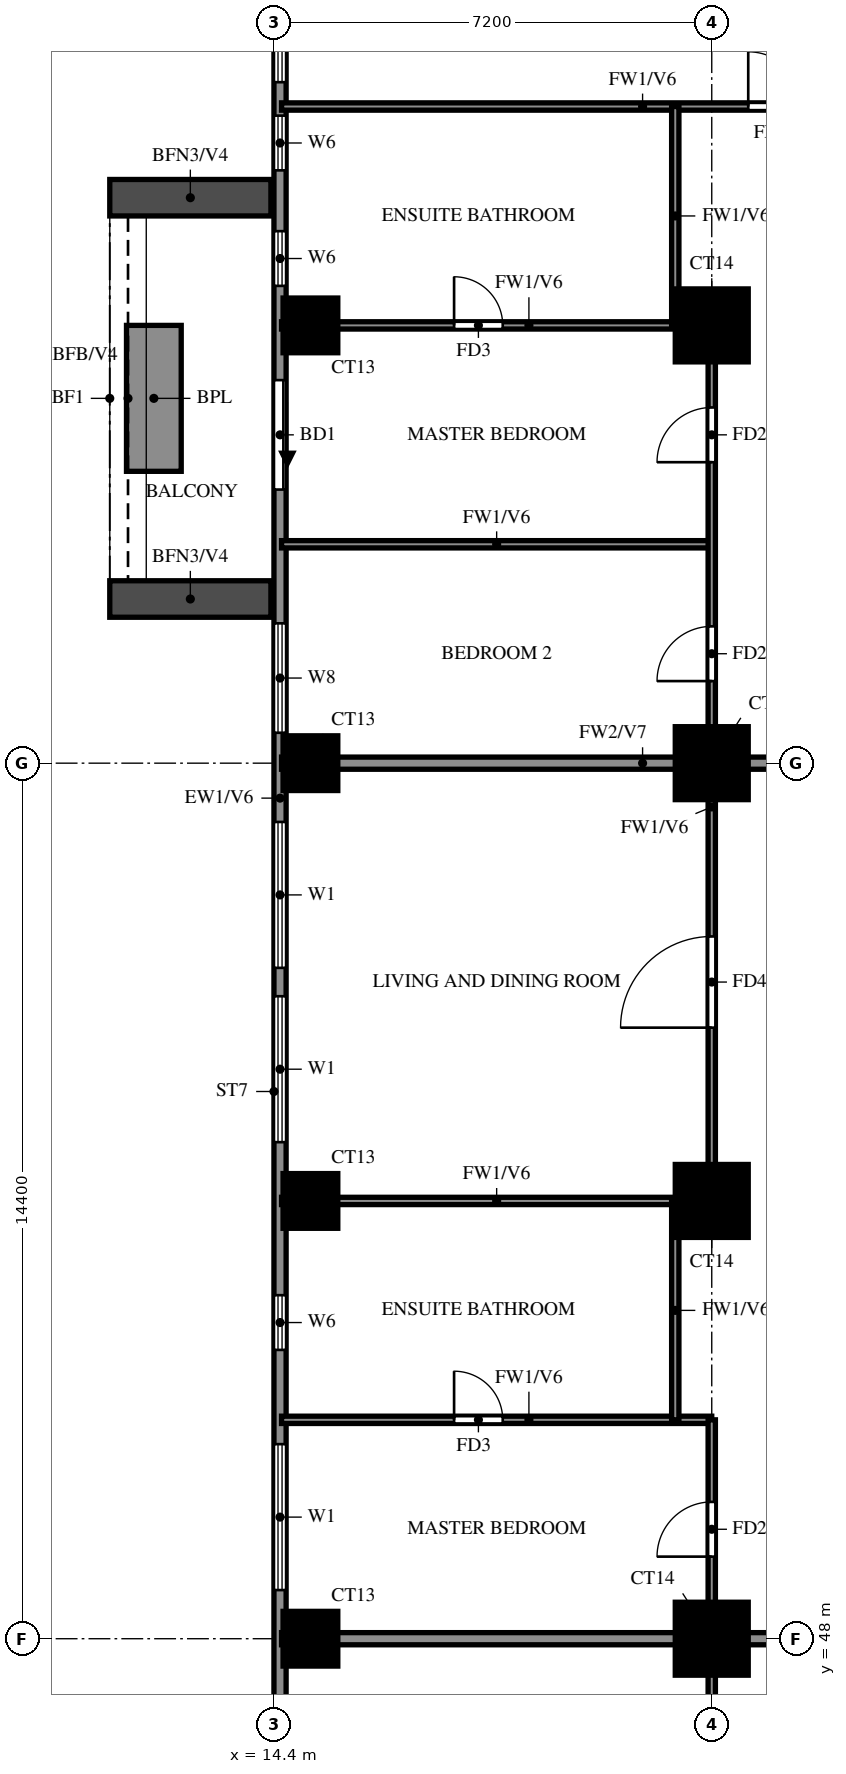
"""IFC4 building model, lengths in metres.
Left out: names, types, materials, properties, quantities, classifications, styles, units other than length and angle.
Written with IfcOpenShell. Run it as: python <this file> out.ifc"""

import sys

from ifc_helpers import new_model, si_unit, direction, frame, frame_2d, origin, origin_2d, place, context, subcontext, project, spatial, rectangle, extrude, source, transform, mapped, element, fill, save


model = new_model("IFC4")
c1 = context("Model", 3, precision=1e-05, world=origin(), true_north=direction((0.0, 1.0)))
c2 = subcontext(c1, "Body", "Model", "MODEL_VIEW")
j1 = project(units=[si_unit("LENGTHUNIT", "METRE"), si_unit("PLANEANGLEUNIT", "RADIAN")], contexts=[c1])
p1 = place(None, origin())
s1 = spatial("IfcSite", under=j1, at=p1, CompositionType="ELEMENT")
p2 = place(p1, origin())
s2 = spatial("IfcBuilding", under=s1, at=p2, CompositionType="ELEMENT")
p3 = place(p2, frame((0.0, 0.0, 104.0)))
s3 = spatial("IfcBuildingStorey", under=s2, at=p3, CompositionType="ELEMENT", Elevation=104.0)
m1 = source(origin(), c2, "Body", "SweptSolid", [
    extrude(rectangle(XDim=0.9, YDim=0.9, at=origin_2d()), origin(), (0.0, 0.0, 1.0), 3.1),
])
p4 = place(p3, frame((15.0, 48.0, 0.0), z_axis=(0.0, 0.0, 1.0), x_axis=(1.0, 0.0, 0.0)))
e1 = element("IfcColumn", 1, at=p4, inside=s3, PredefinedType="COLUMN", context=c2, shape_type="MappedRepresentation", body=[
    mapped(m1, transform((0.0, 0.0, 0.0))),
])
m2 = source(origin(), c2, "Body", "SweptSolid", [
    extrude(rectangle(XDim=1.2, YDim=1.2, at=origin_2d()), origin(), (0.0, 0.0, 1.0), 3.1),
])
p5 = place(p3, frame((21.6, 48.0, 0.0), z_axis=(0.0, 0.0, 1.0), x_axis=(1.0, 0.0, 0.0)))
e2 = element("IfcColumn", 2, at=p5, inside=s3, PredefinedType="COLUMN", context=c2, shape_type="MappedRepresentation", body=[
    mapped(m2, transform((0.0, 0.0, 0.0))),
])
p6 = place(p3, frame((15.0, 55.2, 0.0), z_axis=(0.0, 0.0, 1.0), x_axis=(1.0, 0.0, 0.0)))
e3 = element("IfcColumn", 3, at=p6, inside=s3, PredefinedType="COLUMN", context=c2, shape_type="MappedRepresentation", body=[
    mapped(m1, transform((0.0, 0.0, 0.0))),
])
p7 = place(p3, frame((21.6, 55.2, 0.0), z_axis=(0.0, 0.0, 1.0), x_axis=(1.0, 0.0, 0.0)))
e4 = element("IfcColumn", 4, at=p7, inside=s3, PredefinedType="COLUMN", context=c2, shape_type="MappedRepresentation", body=[
    mapped(m2, transform((0.0, 0.0, 0.0))),
])
p8 = place(p3, frame((15.0, 62.4, 0.0), z_axis=(0.0, 0.0, 1.0), x_axis=(1.0, 0.0, 0.0)))
e5 = element("IfcColumn", 5, at=p8, inside=s3, PredefinedType="COLUMN", context=c2, shape_type="MappedRepresentation", body=[
    mapped(m1, transform((0.0, 0.0, 0.0))),
])
p9 = place(p3, frame((21.6, 62.4, 0.0), z_axis=(0.0, 0.0, 1.0), x_axis=(1.0, 0.0, 0.0)))
e6 = element("IfcColumn", 6, at=p9, inside=s3, PredefinedType="COLUMN", context=c2, shape_type="MappedRepresentation", body=[
    mapped(m2, transform((0.0, 0.0, 0.0))),
])
p10 = place(p3, frame((15.0, 69.6, 0.0), z_axis=(0.0, 0.0, 1.0), x_axis=(1.0, 0.0, 0.0)))
e7 = element("IfcColumn", 7, at=p10, inside=s3, PredefinedType="COLUMN", context=c2, shape_type="MappedRepresentation", body=[
    mapped(m1, transform((0.0, 0.0, 0.0))),
])
p11 = place(p3, frame((21.6, 69.6, 0.0), z_axis=(0.0, 0.0, 1.0), x_axis=(1.0, 0.0, 0.0)))
e8 = element("IfcColumn", 8, at=p11, inside=s3, PredefinedType="COLUMN", context=c2, shape_type="MappedRepresentation", body=[
    mapped(m2, transform((0.0, 0.0, 0.0))),
])
p12 = place(p3, frame((14.5, 76.6, 0.0), z_axis=(0.0, 0.0, 1.0), x_axis=(0.0, -1.0, 0.0)))
e9 = element("IfcWall", 9, at=p12, inside=s3, PredefinedType="SOLIDWALL", context=c2, shape_type="SweptSolid", body=[
    extrude(rectangle(XDim=39.4, YDim=0.2, at=frame_2d((19.7, 0.0))), origin(), (0.0, 0.0, 1.0), 3.1),
])
p13 = place(p12, frame((7.9, 0.0, 0.0)))
e10 = element("IfcOpeningElement", 10, at=p13, cuts=e9, PredefinedType="OPENING", context=c2, shape_type="SweptSolid", body=[
    extrude(rectangle(XDim=1.8, YDim=2.4, at=frame_2d((0.9, 1.2))), frame((0.0, 0.11, 0.0), z_axis=(0.0, -1.0, 0.0), x_axis=(1.0, 0.0, 0.0)), (0.0, 0.0, 1.0), 0.22),
])
p14 = place(p12, frame((29.567, 0.0, 0.6)))
e11 = element("IfcOpeningElement", 11, at=p14, cuts=e9, PredefinedType="OPENING", context=c2, shape_type="SweptSolid", body=[
    extrude(rectangle(XDim=2.4, YDim=2.4, at=frame_2d((1.2, 1.2))), frame((0.0, 0.11, 0.0), z_axis=(0.0, -1.0, 0.0), x_axis=(1.0, 0.0, 0.0)), (0.0, 0.0, 1.0), 0.22),
])
p15 = place(p12, frame((32.433, 0.0, 0.6)))
e12 = element("IfcOpeningElement", 12, at=p15, cuts=e9, PredefinedType="OPENING", context=c2, shape_type="SweptSolid", body=[
    extrude(rectangle(XDim=2.4, YDim=2.4, at=frame_2d((1.2, 1.2))), frame((0.0, 0.11, 0.0), z_axis=(0.0, -1.0, 0.0), x_axis=(1.0, 0.0, 0.0)), (0.0, 0.0, 1.0), 0.22),
])
p16 = place(p12, frame((36.8, 0.0, 0.6)))
e13 = element("IfcOpeningElement", 13, at=p16, cuts=e9, PredefinedType="OPENING", context=c2, shape_type="SweptSolid", body=[
    extrude(rectangle(XDim=1.8, YDim=2.4, at=frame_2d((0.9, 1.2))), frame((0.0, 0.11, 0.0), z_axis=(0.0, -1.0, 0.0), x_axis=(1.0, 0.0, 0.0)), (0.0, 0.0, 1.0), 0.22),
])
p17 = place(p12, frame((25.4, 0.0, 0.6)))
e14 = element("IfcOpeningElement", 14, at=p17, cuts=e9, PredefinedType="OPENING", context=c2, shape_type="SweptSolid", body=[
    extrude(rectangle(XDim=2.4, YDim=2.4, at=frame_2d((1.2, 1.2))), frame((0.0, 0.11, 0.0), z_axis=(0.0, -1.0, 0.0), x_axis=(1.0, 0.0, 0.0)), (0.0, 0.0, 1.0), 0.22),
])
p18 = place(p12, frame((22.95, 0.0, 1.5)))
e15 = element("IfcOpeningElement", 15, at=p18, cuts=e9, PredefinedType="OPENING", context=c2, shape_type="SweptSolid", body=[
    extrude(rectangle(XDim=0.9, YDim=0.9, at=frame_2d((0.45, 0.45))), frame((0.0, 0.11, 0.0), z_axis=(0.0, -1.0, 0.0), x_axis=(1.0, 0.0, 0.0)), (0.0, 0.0, 1.0), 0.22),
])
p19 = place(p12, frame((15.167, 0.0, 0.6)))
e16 = element("IfcOpeningElement", 16, at=p19, cuts=e9, PredefinedType="OPENING", context=c2, shape_type="SweptSolid", body=[
    extrude(rectangle(XDim=2.4, YDim=2.4, at=frame_2d((1.2, 1.2))), frame((0.0, 0.11, 0.0), z_axis=(0.0, -1.0, 0.0), x_axis=(1.0, 0.0, 0.0)), (0.0, 0.0, 1.0), 0.22),
])
p20 = place(p12, frame((18.033, 0.0, 0.6)))
e17 = element("IfcOpeningElement", 17, at=p20, cuts=e9, PredefinedType="OPENING", context=c2, shape_type="SweptSolid", body=[
    extrude(rectangle(XDim=2.4, YDim=2.4, at=frame_2d((1.2, 1.2))), frame((0.0, 0.11, 0.0), z_axis=(0.0, -1.0, 0.0), x_axis=(1.0, 0.0, 0.0)), (0.0, 0.0, 1.0), 0.22),
])
p21 = place(p12, frame((11.9, 0.0, 0.6)))
e18 = element("IfcOpeningElement", 18, at=p21, cuts=e9, PredefinedType="OPENING", context=c2, shape_type="SweptSolid", body=[
    extrude(rectangle(XDim=1.8, YDim=2.4, at=frame_2d((0.9, 1.2))), frame((0.0, 0.11, 0.0), z_axis=(0.0, -1.0, 0.0), x_axis=(1.0, 0.0, 0.0)), (0.0, 0.0, 1.0), 0.22),
])
p22 = place(p12, frame((3.55, 0.0, 1.5)))
e19 = element("IfcOpeningElement", 19, at=p22, cuts=e9, PredefinedType="OPENING", context=c2, shape_type="SweptSolid", body=[
    extrude(rectangle(XDim=0.9, YDim=0.9, at=frame_2d((0.45, 0.45))), frame((0.0, 0.11, 0.0), z_axis=(0.0, -1.0, 0.0), x_axis=(1.0, 0.0, 0.0)), (0.0, 0.0, 1.0), 0.22),
])
p23 = place(p12, frame((5.45, 0.0, 1.5)))
e20 = element("IfcOpeningElement", 20, at=p23, cuts=e9, PredefinedType="OPENING", context=c2, shape_type="SweptSolid", body=[
    extrude(rectangle(XDim=0.9, YDim=0.9, at=frame_2d((0.45, 0.45))), frame((0.0, 0.11, 0.0), z_axis=(0.0, -1.0, 0.0), x_axis=(1.0, 0.0, 0.0)), (0.0, 0.0, 1.0), 0.22),
])
p24 = place(p12, frame((0.6, 0.0, 0.6)))
e21 = element("IfcOpeningElement", 21, at=p24, cuts=e9, PredefinedType="OPENING", context=c2, shape_type="SweptSolid", body=[
    extrude(rectangle(XDim=2.4, YDim=2.4, at=frame_2d((1.2, 1.2))), frame((0.0, 0.11, 0.0), z_axis=(0.0, -1.0, 0.0), x_axis=(1.0, 0.0, 0.0)), (0.0, 0.0, 1.0), 0.22),
])
for number, where, z_axis, x_axis in (
    (22, (14.35, 71.7, 0.0), (0.0, 0.0, 1.0), (-1.0, 0.0, 0.0)),
    (23, (14.35, 65.1, 0.0), (0.0, 0.0, 1.0), (-1.0, 0.0, 0.0)),
):
    element("IfcWall", number, at=place(p3, frame(where, z_axis=z_axis, x_axis=x_axis)), inside=s3, PredefinedType="SOLIDWALL", context=c2, shape_type="SweptSolid", body=[
        extrude(rectangle(XDim=2.65, YDim=0.6, at=frame_2d((1.325, 0.0))), origin(), (0.0, 0.0, 1.0), 2.77),
    ])
p25 = place(p3, frame((12.425, 69.6, 0.0), z_axis=(0.0, 0.0, 1.0), x_axis=(0.0, -1.0, 0.0)))
e24 = element("IfcWall", 24, at=p25, inside=s3, PredefinedType="SOLIDWALL", context=c2, shape_type="SweptSolid", body=[
    extrude(rectangle(XDim=2.4, YDim=0.9, at=frame_2d((1.2, 0.0))), origin(), (0.0, 0.0, 1.0), 0.9),
])
p26 = place(p3, frame((14.525, 48.0, 0.0), z_axis=(0.0, 0.0, 1.0), x_axis=(1.0, 0.0, 0.0)))
e25 = element("IfcWall", 25, at=p26, inside=s3, PredefinedType="SOLIDWALL", context=c2, shape_type="SweptSolid", body=[
    extrude(rectangle(XDim=19.075, YDim=0.2, at=frame_2d((9.538, 0.0))), origin(), (0.0, 0.0, 1.0), 3.1),
])
p27 = place(p3, frame((14.525, 62.4, 0.0), z_axis=(0.0, 0.0, 1.0), x_axis=(1.0, 0.0, 0.0)))
e26 = element("IfcWall", 26, at=p27, inside=s3, PredefinedType="SOLIDWALL", context=c2, shape_type="SweptSolid", body=[
    extrude(rectangle(XDim=11.875, YDim=0.2, at=frame_2d((5.938, 0.0))), origin(), (0.0, 0.0, 1.0), 3.1),
])
p28 = place(p3, frame((14.525, 51.6, 0.0), z_axis=(0.0, 0.0, 1.0), x_axis=(1.0, 0.0, 0.0)))
e27 = element("IfcWall", 27, at=p28, inside=s3, PredefinedType="PARTITIONING", context=c2, shape_type="SweptSolid", body=[
    extrude(rectangle(XDim=7.075, YDim=0.12, at=frame_2d((3.538, 0.0))), origin(), (0.0, 0.0, 1.0), 3.1),
])
p29 = place(p28, frame((2.837, 0.0, 0.0)))
e28 = element("IfcOpeningElement", 28, at=p29, cuts=e27, PredefinedType="OPENING", context=c2, shape_type="SweptSolid", body=[
    extrude(rectangle(XDim=0.8, YDim=2.1, at=frame_2d((0.4, 1.05))), frame((0.0, 0.07, 0.0), z_axis=(0.0, -1.0, 0.0), x_axis=(1.0, 0.0, 0.0)), (0.0, 0.0, 1.0), 0.14),
])
for number, where, z_axis, x_axis in (
    (29, (14.525, 55.2, 0.0), (0.0, 0.0, 1.0), (1.0, 0.0, 0.0)),
    (30, (14.525, 66.0, 0.0), (0.0, 0.0, 1.0), (1.0, 0.0, 0.0)),
):
    element("IfcWall", number, at=place(p3, frame(where, z_axis=z_axis, x_axis=x_axis)), inside=s3, PredefinedType="PARTITIONING", context=c2, shape_type="SweptSolid", body=[
        extrude(rectangle(XDim=7.075, YDim=0.12, at=frame_2d((3.538, 0.0))), origin(), (0.0, 0.0, 1.0), 3.1),
    ])
p30 = place(p3, frame((14.525, 69.6, 0.0), z_axis=(0.0, 0.0, 1.0), x_axis=(1.0, 0.0, 0.0)))
e31 = element("IfcWall", 31, at=p30, inside=s3, PredefinedType="PARTITIONING", context=c2, shape_type="SweptSolid", body=[
    extrude(rectangle(XDim=7.075, YDim=0.12, at=frame_2d((3.538, 0.0))), origin(), (0.0, 0.0, 1.0), 3.1),
])
p31 = place(p30, frame((2.837, 0.0, 0.0)))
e32 = element("IfcOpeningElement", 32, at=p31, cuts=e31, PredefinedType="OPENING", context=c2, shape_type="SweptSolid", body=[
    extrude(rectangle(XDim=0.8, YDim=2.1, at=frame_2d((0.4, 1.05))), frame((0.0, 0.07, 0.0), z_axis=(0.0, -1.0, 0.0), x_axis=(1.0, 0.0, 0.0)), (0.0, 0.0, 1.0), 0.14),
])
p32 = place(p3, frame((14.525, 73.2, 0.0), z_axis=(0.0, 0.0, 1.0), x_axis=(1.0, 0.0, 0.0)))
e33 = element("IfcWall", 33, at=p32, inside=s3, PredefinedType="PARTITIONING", context=c2, shape_type="SweptSolid", body=[
    extrude(rectangle(XDim=11.875, YDim=0.12, at=frame_2d((5.938, 0.0))), origin(), (0.0, 0.0, 1.0), 3.1),
])
p33 = place(p32, frame((7.675, 0.0, 0.0)))
e34 = element("IfcOpeningElement", 34, at=p33, cuts=e33, PredefinedType="OPENING", context=c2, shape_type="SweptSolid", body=[
    extrude(rectangle(XDim=0.9, YDim=2.1, at=frame_2d((0.45, 1.05))), frame((0.0, 0.07, 0.0), z_axis=(0.0, -1.0, 0.0), x_axis=(1.0, 0.0, 0.0)), (0.0, 0.0, 1.0), 0.14),
])
for number, where, z_axis, x_axis in (
    (35, (21.0, 51.6, 0.0), (0.0, 0.0, 1.0), (0.0, 1.0, 0.0)),
    (36, (21.0, 69.6, 0.0), (0.0, 0.0, 1.0), (0.0, 1.0, 0.0)),
):
    element("IfcWall", number, at=place(p3, frame(where, z_axis=z_axis, x_axis=x_axis)), inside=s3, PredefinedType="PARTITIONING", context=c2, shape_type="SweptSolid", body=[
        extrude(rectangle(XDim=3.6, YDim=0.12, at=frame_2d((1.8, 0.0))), origin(), (0.0, 0.0, 1.0), 3.1),
    ])
p34 = place(p3, frame((21.6, 33.725, 0.0), z_axis=(0.0, 0.0, 1.0), x_axis=(0.0, 1.0, 0.0)))
e37 = element("IfcWall", 37, at=p34, inside=s3, PredefinedType="PARTITIONING", context=c2, shape_type="SweptSolid", body=[
    extrude(rectangle(XDim=17.875, YDim=0.12, at=frame_2d((8.938, 0.0))), origin(), (0.0, 0.0, 1.0), 3.1),
])
p35 = place(p34, frame((7.775, 0.0, 0.0)))
e38 = element("IfcOpeningElement", 38, at=p35, cuts=e37, PredefinedType="OPENING", context=c2, shape_type="SweptSolid", body=[
    extrude(rectangle(XDim=0.9, YDim=2.1, at=frame_2d((0.45, 1.05))), frame((0.0, 0.07, 0.0), z_axis=(0.0, -1.0, 0.0), x_axis=(1.0, 0.0, 0.0)), (0.0, 0.0, 1.0), 0.14),
])
p36 = place(p34, frame((15.625, 0.0, 0.0)))
e39 = element("IfcOpeningElement", 39, at=p36, cuts=e37, PredefinedType="OPENING", context=c2, shape_type="SweptSolid", body=[
    extrude(rectangle(XDim=0.9, YDim=2.1, at=frame_2d((0.45, 1.05))), frame((0.0, 0.07, 0.0), z_axis=(0.0, -1.0, 0.0), x_axis=(1.0, 0.0, 0.0)), (0.0, 0.0, 1.0), 0.14),
])
p37 = place(p3, frame((21.6, 55.2, 0.0), z_axis=(0.0, 0.0, 1.0), x_axis=(0.0, 1.0, 0.0)))
e40 = element("IfcWall", 40, at=p37, inside=s3, PredefinedType="PARTITIONING", context=c2, shape_type="SweptSolid", body=[
    extrude(rectangle(XDim=14.4, YDim=0.12, at=frame_2d((7.2, 0.0))), origin(), (0.0, 0.0, 1.0), 3.1),
])
p38 = place(p37, frame((2.85, 0.0, 0.0)))
e41 = element("IfcOpeningElement", 41, at=p38, cuts=e40, PredefinedType="OPENING", context=c2, shape_type="SweptSolid", body=[
    extrude(rectangle(XDim=1.5, YDim=2.1, at=frame_2d((0.75, 1.05))), frame((0.0, 0.07, 0.0), z_axis=(0.0, -1.0, 0.0), x_axis=(1.0, 0.0, 0.0)), (0.0, 0.0, 1.0), 0.14),
])
p39 = place(p37, frame((8.55, 0.0, 0.0)))
e42 = element("IfcOpeningElement", 42, at=p39, cuts=e40, PredefinedType="OPENING", context=c2, shape_type="SweptSolid", body=[
    extrude(rectangle(XDim=0.9, YDim=2.1, at=frame_2d((0.45, 1.05))), frame((0.0, 0.07, 0.0), z_axis=(0.0, -1.0, 0.0), x_axis=(1.0, 0.0, 0.0)), (0.0, 0.0, 1.0), 0.14),
])
p40 = place(p37, frame((12.15, 0.0, 0.0)))
e43 = element("IfcOpeningElement", 43, at=p40, cuts=e40, PredefinedType="OPENING", context=c2, shape_type="SweptSolid", body=[
    extrude(rectangle(XDim=0.9, YDim=2.1, at=frame_2d((0.45, 1.05))), frame((0.0, 0.07, 0.0), z_axis=(0.0, -1.0, 0.0), x_axis=(1.0, 0.0, 0.0)), (0.0, 0.0, 1.0), 0.14),
])
p41 = place(p13, origin())
e44 = element("IfcDoor", 44, at=p41, inside=s3, OperationType="DOUBLE_DOOR_SLIDING", PredefinedType="DOOR", context=c2, shape_type="SweptSolid", body=[
    extrude(rectangle(XDim=1.8, YDim=2.4, at=frame_2d((0.9, 1.2))), frame((0.0, 0.025, 0.0), z_axis=(0.0, -1.0, 0.0), x_axis=(1.0, 0.0, 0.0)), (0.0, 0.0, 1.0), 0.05),
])
fill(e10, e44)
p42 = place(p17, origin())
e45 = element("IfcWindow", 45, at=p42, inside=s3, PartitioningType="DOUBLE_PANEL_VERTICAL", PredefinedType="WINDOW", context=c2, shape_type="SweptSolid", body=[
    extrude(rectangle(XDim=2.4, YDim=2.4, at=frame_2d((1.2, 1.2))), frame((0.0, 0.03, 0.0), z_axis=(0.0, -1.0, 0.0), x_axis=(1.0, 0.0, 0.0)), (0.0, 0.0, 1.0), 0.06),
])
fill(e14, e45)
p43 = place(p18, origin())
e46 = element("IfcWindow", 46, at=p43, inside=s3, PartitioningType="SINGLE_PANEL", PredefinedType="WINDOW", context=c2, shape_type="SweptSolid", body=[
    extrude(rectangle(XDim=0.9, YDim=0.9, at=frame_2d((0.45, 0.45))), frame((0.0, 0.03, 0.0), z_axis=(0.0, -1.0, 0.0), x_axis=(1.0, 0.0, 0.0)), (0.0, 0.0, 1.0), 0.06),
])
fill(e15, e46)
p44 = place(p19, origin())
e47 = element("IfcWindow", 47, at=p44, inside=s3, PartitioningType="DOUBLE_PANEL_VERTICAL", PredefinedType="WINDOW", context=c2, shape_type="SweptSolid", body=[
    extrude(rectangle(XDim=2.4, YDim=2.4, at=frame_2d((1.2, 1.2))), frame((0.0, 0.03, 0.0), z_axis=(0.0, -1.0, 0.0), x_axis=(1.0, 0.0, 0.0)), (0.0, 0.0, 1.0), 0.06),
])
fill(e16, e47)
p45 = place(p20, origin())
e48 = element("IfcWindow", 48, at=p45, inside=s3, PartitioningType="DOUBLE_PANEL_VERTICAL", PredefinedType="WINDOW", context=c2, shape_type="SweptSolid", body=[
    extrude(rectangle(XDim=2.4, YDim=2.4, at=frame_2d((1.2, 1.2))), frame((0.0, 0.03, 0.0), z_axis=(0.0, -1.0, 0.0), x_axis=(1.0, 0.0, 0.0)), (0.0, 0.0, 1.0), 0.06),
])
fill(e17, e48)
p46 = place(p21, origin())
e49 = element("IfcWindow", 49, at=p46, inside=s3, PartitioningType="DOUBLE_PANEL_VERTICAL", PredefinedType="WINDOW", context=c2, shape_type="SweptSolid", body=[
    extrude(rectangle(XDim=1.8, YDim=2.4, at=frame_2d((0.9, 1.2))), frame((0.0, 0.03, 0.0), z_axis=(0.0, -1.0, 0.0), x_axis=(1.0, 0.0, 0.0)), (0.0, 0.0, 1.0), 0.06),
])
fill(e18, e49)
p47 = place(p22, origin())
e50 = element("IfcWindow", 50, at=p47, inside=s3, PartitioningType="SINGLE_PANEL", PredefinedType="WINDOW", context=c2, shape_type="SweptSolid", body=[
    extrude(rectangle(XDim=0.9, YDim=0.9, at=frame_2d((0.45, 0.45))), frame((0.0, 0.03, 0.0), z_axis=(0.0, -1.0, 0.0), x_axis=(1.0, 0.0, 0.0)), (0.0, 0.0, 1.0), 0.06),
])
fill(e19, e50)
p48 = place(p23, origin())
e51 = element("IfcWindow", 51, at=p48, inside=s3, PartitioningType="SINGLE_PANEL", PredefinedType="WINDOW", context=c2, shape_type="SweptSolid", body=[
    extrude(rectangle(XDim=0.9, YDim=0.9, at=frame_2d((0.45, 0.45))), frame((0.0, 0.03, 0.0), z_axis=(0.0, -1.0, 0.0), x_axis=(1.0, 0.0, 0.0)), (0.0, 0.0, 1.0), 0.06),
])
fill(e20, e51)
p49 = place(p24, origin())
e52 = element("IfcWindow", 52, at=p49, inside=s3, PartitioningType="DOUBLE_PANEL_VERTICAL", PredefinedType="WINDOW", context=c2, shape_type="SweptSolid", body=[
    extrude(rectangle(XDim=2.4, YDim=2.4, at=frame_2d((1.2, 1.2))), frame((0.0, 0.03, 0.0), z_axis=(0.0, -1.0, 0.0), x_axis=(1.0, 0.0, 0.0)), (0.0, 0.0, 1.0), 0.06),
])
fill(e21, e52)
p50 = place(p36, origin())
e53 = element("IfcDoor", 53, at=p50, inside=s3, OperationType="SINGLE_SWING_RIGHT", PredefinedType="DOOR", context=c2, shape_type="SweptSolid", body=[
    extrude(rectangle(XDim=0.9, YDim=2.1, at=frame_2d((0.45, 1.05))), frame((0.0, 0.025, 0.0), z_axis=(0.0, -1.0, 0.0), x_axis=(1.0, 0.0, 0.0)), (0.0, 0.0, 1.0), 0.05),
])
fill(e39, e53)
p51 = place(p29, origin())
e54 = element("IfcDoor", 54, at=p51, inside=s3, OperationType="SINGLE_SWING_LEFT", PredefinedType="DOOR", context=c2, shape_type="SweptSolid", body=[
    extrude(rectangle(XDim=0.8, YDim=2.1, at=frame_2d((0.4, 1.05))), frame((0.0, 0.025, 0.0), z_axis=(0.0, -1.0, 0.0), x_axis=(1.0, 0.0, 0.0)), (0.0, 0.0, 1.0), 0.05),
])
fill(e28, e54)
p52 = place(p38, origin())
e55 = element("IfcDoor", 55, at=p52, inside=s3, OperationType="SINGLE_SWING_LEFT", PredefinedType="DOOR", context=c2, shape_type="SweptSolid", body=[
    extrude(rectangle(XDim=1.5, YDim=2.1, at=frame_2d((0.75, 1.05))), frame((0.0, 0.025, 0.0), z_axis=(0.0, -1.0, 0.0), x_axis=(1.0, 0.0, 0.0)), (0.0, 0.0, 1.0), 0.05),
])
fill(e41, e55)
p53 = place(p39, origin())
e56 = element("IfcDoor", 56, at=p53, inside=s3, OperationType="SINGLE_SWING_LEFT", PredefinedType="DOOR", context=c2, shape_type="SweptSolid", body=[
    extrude(rectangle(XDim=0.9, YDim=2.1, at=frame_2d((0.45, 1.05))), frame((0.0, 0.025, 0.0), z_axis=(0.0, -1.0, 0.0), x_axis=(1.0, 0.0, 0.0)), (0.0, 0.0, 1.0), 0.05),
])
fill(e42, e56)
p54 = place(p40, origin())
e57 = element("IfcDoor", 57, at=p54, inside=s3, OperationType="SINGLE_SWING_LEFT", PredefinedType="DOOR", context=c2, shape_type="SweptSolid", body=[
    extrude(rectangle(XDim=0.9, YDim=2.1, at=frame_2d((0.45, 1.05))), frame((0.0, 0.025, 0.0), z_axis=(0.0, -1.0, 0.0), x_axis=(1.0, 0.0, 0.0)), (0.0, 0.0, 1.0), 0.05),
])
fill(e43, e57)
p55 = place(p31, origin())
e58 = element("IfcDoor", 58, at=p55, inside=s3, OperationType="SINGLE_SWING_RIGHT", PredefinedType="DOOR", context=c2, shape_type="SweptSolid", body=[
    extrude(rectangle(XDim=0.8, YDim=2.1, at=frame_2d((0.4, 1.05))), frame((0.0, 0.025, 0.0), z_axis=(0.0, -1.0, 0.0), x_axis=(1.0, 0.0, 0.0)), (0.0, 0.0, 1.0), 0.05),
])
fill(e32, e58)
p56 = place(p33, origin())
e59 = element("IfcDoor", 59, at=p56, inside=s3, OperationType="SINGLE_SWING_LEFT", PredefinedType="DOOR", context=c2, shape_type="SweptSolid", body=[
    extrude(rectangle(XDim=0.9, YDim=2.1, at=frame_2d((0.45, 1.05))), frame((0.0, 0.025, 0.0), z_axis=(0.0, -1.0, 0.0), x_axis=(1.0, 0.0, 0.0)), (0.0, 0.0, 1.0), 0.05),
])
fill(e34, e59)
save(model, sys.argv[1])
